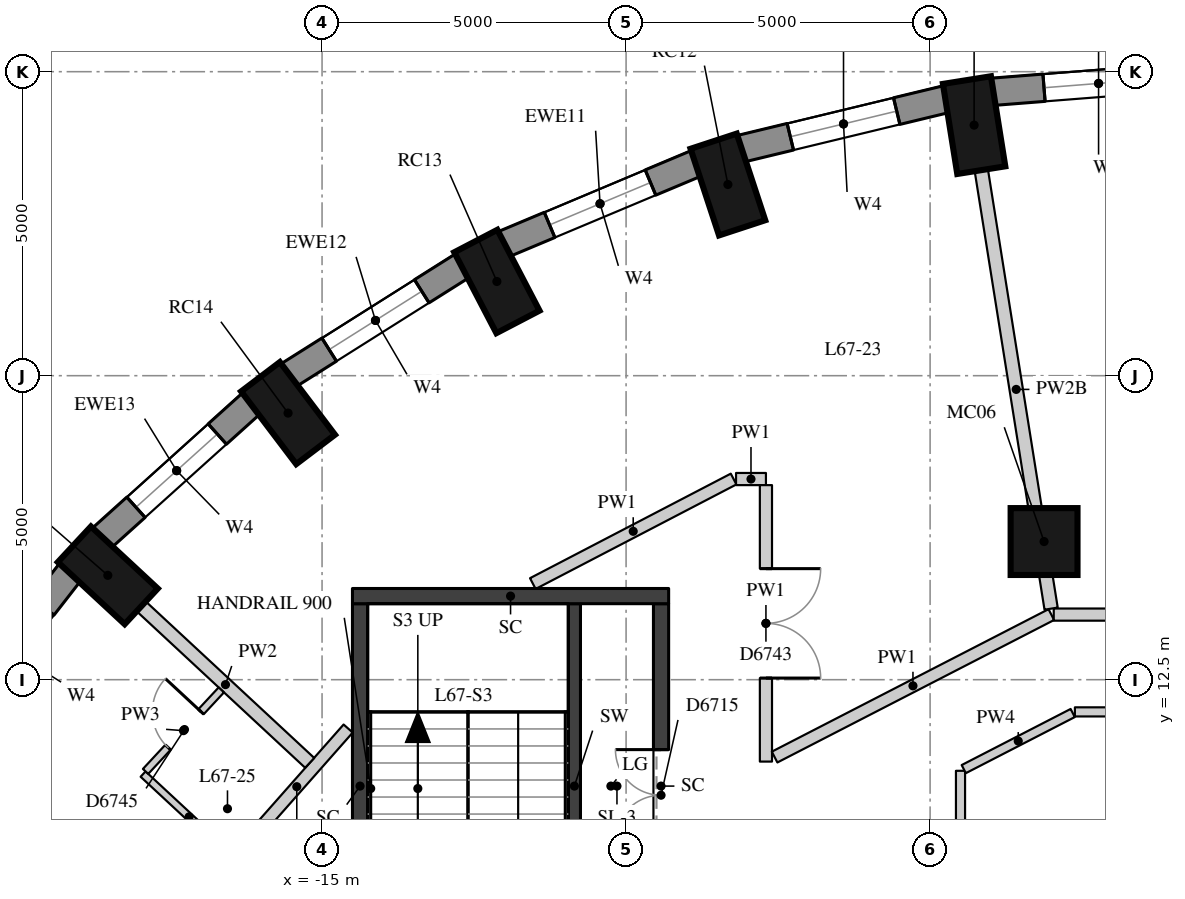
"""IFC4 building model, lengths in metres.
Left out: names, types, materials, properties, quantities, classifications, styles, units other than length and angle.
Written with IfcOpenShell. Run it as: python <this file> out.ifc"""

import sys

from ifc_helpers import new_model, si_unit, direction, frame, frame_2d, origin, origin_2d, place, context, subcontext, project, spatial, rectangle, extrude, element, fill, save


model = new_model("IFC4")
c1 = context("Model", 3, precision=1e-05, world=origin(), true_north=direction((0.0, 1.0)))
c2 = subcontext(c1, "Body", "Model", "MODEL_VIEW")
j1 = project(units=[si_unit("LENGTHUNIT", "METRE"), si_unit("PLANEANGLEUNIT", "RADIAN")], contexts=[c1])
p1 = place(None, origin())
s1 = spatial("IfcSite", under=j1, at=p1, CompositionType="ELEMENT")
p2 = place(p1, origin())
s2 = spatial("IfcBuilding", under=s1, at=p2, CompositionType="ELEMENT")
p3 = place(p2, frame((0.0, 0.0, 236.6)))
s3 = spatial("IfcBuildingStorey", under=s2, at=p3, CompositionType="ELEMENT", Elevation=236.6)
for number, where, z_axis, x_axis in (
    (1, (-4.276, 21.621, 0.0), (0.0, 0.0, 1.0), (-0.157, 0.988, 0.0)),
    (2, (-8.326, 20.644, 0.0), (0.0, 0.0, 1.0), (-0.312, 0.95, 0.0)),
    (3, (-12.125, 19.05, 0.0), (0.0, 0.0, 1.0), (-0.462, 0.887, 0.0)),
    (4, (-15.559, 16.885, 0.0), (0.0, 0.0, 1.0), (-0.604, 0.797, 0.0)),
    (5, (-18.523, 14.216, 0.0), (0.0, 0.0, 1.0), (-0.733, 0.681, 0.0)),
):
    element("IfcColumn", number, at=place(p3, frame(where, z_axis=z_axis, x_axis=x_axis)), inside=s3, PredefinedType="COLUMN", context=c2, shape_type="SweptSolid", body=[
        extrude(rectangle(XDim=1.5, YDim=0.8, at=origin_2d()), origin(), (0.0, 0.0, 1.0), 3.3),
    ])
p4 = place(p3, frame((-3.126, 14.772, 0.0), z_axis=(0.0, 0.0, 1.0), x_axis=(1.0, 0.0, 0.0)))
e6 = element("IfcColumn", 6, at=p4, inside=s3, PredefinedType="COLUMN", context=c2, shape_type="SweptSolid", body=[
    extrude(rectangle(XDim=1.1, YDim=1.1, at=origin_2d()), origin(), (0.0, 0.0, 1.0), 3.3),
])
p5 = place(p3, frame((-0.48, 22.444, 0.0), z_axis=(0.0, 0.0, 1.0), x_axis=(-0.996910775835, -0.078542377245, 0.0)))
e7 = element("IfcWall", 7, at=p5, inside=s3, PredefinedType="SOLIDWALL", context=c2, shape_type="SweptSolid", body=[
    extrude(rectangle(XDim=3.509, YDim=0.45, at=frame_2d((1.755, 0.0))), origin(), (0.0, 0.0, 1.0), 3.02),
])
p6 = place(p5, frame((0.855, 0.0, 0.4)))
e8 = element("IfcOpeningElement", 8, at=p6, cuts=e7, PredefinedType="OPENING", context=c2, shape_type="SweptSolid", body=[
    extrude(rectangle(XDim=1.8, YDim=1.75, at=frame_2d((0.9, 0.875))), frame((0.0, 0.235, 0.0), z_axis=(0.0, -1.0, 0.0), x_axis=(1.0, 0.0, 0.0)), (0.0, 0.0, 1.0), 0.47),
])
p7 = place(p3, frame((-4.729, 22.05, 0.0), z_axis=(0.0, 0.0, 1.0), x_axis=(-0.972099278496, -0.23456980357, 0.0)))
e9 = element("IfcWall", 9, at=p7, inside=s3, PredefinedType="SOLIDWALL", context=c2, shape_type="SweptSolid", body=[
    extrude(rectangle(XDim=3.487, YDim=0.45, at=frame_2d((1.743, 0.0))), origin(), (0.0, 0.0, 1.0), 3.02),
])
p8 = place(p7, frame((0.843, 0.0, 0.4)))
e10 = element("IfcOpeningElement", 10, at=p8, cuts=e9, PredefinedType="OPENING", context=c2, shape_type="SweptSolid", body=[
    extrude(rectangle(XDim=1.8, YDim=1.75, at=frame_2d((0.9, 0.875))), frame((0.0, 0.235, 0.0), z_axis=(0.0, -1.0, 0.0), x_axis=(1.0, 0.0, 0.0)), (0.0, 0.0, 1.0), 0.47),
])
p9 = place(p3, frame((-8.841, 20.995, 0.0), z_axis=(0.0, 0.0, 1.0), x_axis=(-0.922024627475, -0.387131226239, 0.0)))
e11 = element("IfcWall", 11, at=p9, inside=s3, PredefinedType="SOLIDWALL", context=c2, shape_type="SweptSolid", body=[
    extrude(rectangle(XDim=3.443, YDim=0.45, at=frame_2d((1.722, 0.0))), origin(), (0.0, 0.0, 1.0), 3.02),
])
p10 = place(p9, frame((0.822, 0.0, 0.4)))
e12 = element("IfcOpeningElement", 12, at=p10, cuts=e11, PredefinedType="OPENING", context=c2, shape_type="SweptSolid", body=[
    extrude(rectangle(XDim=1.8, YDim=1.75, at=frame_2d((0.9, 0.875))), frame((0.0, 0.235, 0.0), z_axis=(0.0, -1.0, 0.0), x_axis=(1.0, 0.0, 0.0)), (0.0, 0.0, 1.0), 0.47),
])
p11 = place(p3, frame((-12.69, 19.311, 0.0), z_axis=(0.0, 0.0, 1.0), x_axis=(-0.845929139811, -0.53329531258, 0.0)))
e13 = element("IfcWall", 13, at=p11, inside=s3, PredefinedType="SOLIDWALL", context=c2, shape_type="SweptSolid", body=[
    extrude(rectangle(XDim=3.385, YDim=0.45, at=frame_2d((1.692, 0.0))), origin(), (0.0, 0.0, 1.0), 3.02),
])
p12 = place(p11, frame((0.792, 0.0, 0.4)))
e14 = element("IfcOpeningElement", 14, at=p12, cuts=e13, PredefinedType="OPENING", context=c2, shape_type="SweptSolid", body=[
    extrude(rectangle(XDim=1.8, YDim=1.75, at=frame_2d((0.9, 0.875))), frame((0.0, 0.235, 0.0), z_axis=(0.0, -1.0, 0.0), x_axis=(1.0, 0.0, 0.0)), (0.0, 0.0, 1.0), 0.47),
])
p13 = place(p3, frame((-16.159, 17.047, 0.0), z_axis=(0.0, 0.0, 1.0), x_axis=(-0.743166014219, -0.669107073128, 0.0)))
e15 = element("IfcWall", 15, at=p13, inside=s3, PredefinedType="SOLIDWALL", context=c2, shape_type="SweptSolid", body=[
    extrude(rectangle(XDim=3.316, YDim=0.45, at=frame_2d((1.658, 0.0))), origin(), (0.0, 0.0, 1.0), 3.02),
])
p14 = place(p13, frame((0.758, 0.0, 0.4)))
e16 = element("IfcOpeningElement", 16, at=p14, cuts=e15, PredefinedType="OPENING", context=c2, shape_type="SweptSolid", body=[
    extrude(rectangle(XDim=1.8, YDim=1.75, at=frame_2d((0.9, 0.875))), frame((0.0, 0.235, 0.0), z_axis=(0.0, -1.0, 0.0), x_axis=(1.0, 0.0, 0.0)), (0.0, 0.0, 1.0), 0.47),
])
p15 = place(p3, frame((-19.142, 14.272, 0.0), z_axis=(0.0, 0.0, 1.0), x_axis=(-0.613862536705, -0.789412937587, 0.0)))
e17 = element("IfcWall", 17, at=p15, inside=s3, PredefinedType="SOLIDWALL", context=c2, shape_type="SweptSolid", body=[
    extrude(rectangle(XDim=3.247, YDim=0.45, at=frame_2d((1.624, 0.0))), origin(), (0.0, 0.0, 1.0), 3.02),
])
p16 = place(p15, frame((0.724, 0.0, 0.4)))
e18 = element("IfcOpeningElement", 18, at=p16, cuts=e17, PredefinedType="OPENING", context=c2, shape_type="SweptSolid", body=[
    extrude(rectangle(XDim=1.8, YDim=1.75, at=frame_2d((0.9, 0.875))), frame((0.0, 0.235, 0.0), z_axis=(0.0, -1.0, 0.0), x_axis=(1.0, 0.0, 0.0)), (0.0, 0.0, 1.0), 0.47),
])
p17 = place(p3, frame((-10.85, 7.75, 0.0), z_axis=(0.0, 0.0, 1.0), x_axis=(0.0, 1.0, 0.0)))
e19 = element("IfcWall", 19, at=p17, inside=s3, PredefinedType="SHEAR", context=c2, shape_type="SweptSolid", body=[
    extrude(rectangle(XDim=6.0, YDim=0.2, at=frame_2d((3.0, 0.0))), origin(), (0.0, 0.0, 1.0), 3.02),
])
p18 = place(p17, frame((0.1, 0.0, 0.0)))
e20 = element("IfcOpeningElement", 20, at=p18, cuts=e19, PredefinedType="OPENING", context=c2, shape_type="SweptSolid", body=[
    extrude(rectangle(XDim=1.5, YDim=2.1, at=frame_2d((0.75, 1.05))), frame((0.0, 0.11, 0.0), z_axis=(0.0, -1.0, 0.0), x_axis=(1.0, 0.0, 0.0)), (0.0, 0.0, 1.0), 0.22),
])
p19 = place(p3, frame((-14.375, 7.75, -0.28), z_axis=(0.0, 0.0, 1.0), x_axis=(0.0, 1.0, 0.0)))
e21 = element("IfcWall", 21, at=p19, inside=s3, PredefinedType="SHEAR", context=c2, shape_type="SweptSolid", body=[
    extrude(rectangle(XDim=6.0, YDim=0.25, at=frame_2d((3.0, 0.0))), origin(), (0.0, 0.0, 1.0), 3.3),
])
p20 = place(p3, frame((-9.425, 7.75, -0.28), z_axis=(0.0, 0.0, 1.0), x_axis=(0.0, 1.0, 0.0)))
e22 = element("IfcWall", 22, at=p20, inside=s3, PredefinedType="SHEAR", context=c2, shape_type="SweptSolid", body=[
    extrude(rectangle(XDim=6.0, YDim=0.25, at=frame_2d((3.0, 0.0))), origin(), (0.0, 0.0, 1.0), 3.3),
])
p21 = place(p20, frame((2.1, 0.0, 0.28)))
e23 = element("IfcOpeningElement", 23, at=p21, cuts=e22, PredefinedType="OPENING", context=c2, shape_type="SweptSolid", body=[
    extrude(rectangle(XDim=1.5, YDim=2.1, at=frame_2d((0.75, 1.05))), frame((0.0, 0.135, 0.0), z_axis=(0.0, -1.0, 0.0), x_axis=(1.0, 0.0, 0.0)), (0.0, 0.0, 1.0), 0.27),
])
p22 = place(p3, frame((-14.5, 13.875, -0.28), z_axis=(0.0, 0.0, 1.0), x_axis=(1.0, 0.0, 0.0)))
e24 = element("IfcWall", 24, at=p22, inside=s3, PredefinedType="SHEAR", context=c2, shape_type="SweptSolid", body=[
    extrude(rectangle(XDim=5.2, YDim=0.25, at=frame_2d((2.6, 0.0))), origin(), (0.0, 0.0, 1.0), 3.3),
])
p23 = place(p3, frame((-11.534, 14.081, 0.0), z_axis=(0.0, 0.0, 1.0), x_axis=(0.886975089277, 0.461817270143, 0.0)))
e25 = element("IfcWall", 25, at=p23, inside=s3, PredefinedType="PARTITIONING", context=c2, shape_type="SweptSolid", body=[
    extrude(rectangle(XDim=3.723, YDim=0.2, at=frame_2d((1.861, 0.0))), origin(), (0.0, 0.0, 1.0), 3.02),
])
p24 = place(p3, frame((-8.192, 15.8, 0.0), z_axis=(0.0, 0.0, 1.0), x_axis=(1.0, 0.0, 0.0)))
e26 = element("IfcWall", 26, at=p24, inside=s3, PredefinedType="PARTITIONING", context=c2, shape_type="SweptSolid", body=[
    extrude(rectangle(XDim=0.492, YDim=0.2, at=frame_2d((0.246, 0.0))), origin(), (0.0, 0.0, 1.0), 3.02),
])
p25 = place(p3, frame((-7.7, 15.7, 0.0), z_axis=(0.0, 0.0, 1.0), x_axis=(0.0, -1.0, 0.0)))
e27 = element("IfcWall", 27, at=p25, inside=s3, PredefinedType="PARTITIONING", context=c2, shape_type="SweptSolid", body=[
    extrude(rectangle(XDim=4.547, YDim=0.2, at=frame_2d((2.273, 0.0))), origin(), (0.0, 0.0, 1.0), 3.02),
])
p26 = place(p25, frame((1.374, 0.0, 0.0)))
e28 = element("IfcOpeningElement", 28, at=p26, cuts=e27, PredefinedType="OPENING", context=c2, shape_type="SweptSolid", body=[
    extrude(rectangle(XDim=1.8, YDim=2.1, at=frame_2d((0.9, 1.05))), frame((0.0, 0.11, 0.0), z_axis=(0.0, -1.0, 0.0), x_axis=(1.0, 0.0, 0.0)), (0.0, 0.0, 1.0), 0.22),
])
p27 = place(p3, frame((-7.557, 11.227, 0.0), z_axis=(0.0, 0.0, 1.0), x_axis=(0.889060449642, 0.457789817364, 0.0)))
e29 = element("IfcWall", 29, at=p27, inside=s3, PredefinedType="PARTITIONING", context=c2, shape_type="SweptSolid", body=[
    extrude(rectangle(XDim=5.119, YDim=0.2, at=frame_2d((2.559, 0.0))), origin(), (0.0, 0.0, 1.0), 3.02),
])
p28 = place(p3, frame((-2.967, 13.571, 0.0), z_axis=(0.0, 0.0, 1.0), x_axis=(1.0, 0.0, 0.0)))
e30 = element("IfcWall", 30, at=p28, inside=s3, PredefinedType="PARTITIONING", context=c2, shape_type="SweptSolid", body=[
    extrude(rectangle(XDim=5.773, YDim=0.2, at=frame_2d((2.887, 0.0))), origin(), (0.0, 0.0, 1.0), 3.02),
])
p29 = place(p28, frame((2.441, 0.0, 0.0)))
e31 = element("IfcOpeningElement", 31, at=p29, cuts=e30, PredefinedType="OPENING", context=c2, shape_type="SweptSolid", body=[
    extrude(rectangle(XDim=1.1, YDim=2.1, at=frame_2d((0.55, 1.05))), frame((0.0, 0.11, 0.0), z_axis=(0.0, -1.0, 0.0), x_axis=(1.0, 0.0, 0.0)), (0.0, 0.0, 1.0), 0.22),
])
p30 = place(p3, frame((-16.26, 9.783, 0.0), z_axis=(0.0, 0.0, 1.0), x_axis=(0.66199168739, 0.74951117792, 0.0)))
e32 = element("IfcWall", 32, at=p30, inside=s3, PredefinedType="PARTITIONING", context=c2, shape_type="SweptSolid", body=[
    extrude(rectangle(XDim=2.552, YDim=0.2, at=frame_2d((1.276, 0.0))), origin(), (0.0, 0.0, 1.0), 3.02),
])
p31 = place(p3, frame((-2.619, 11.97, 0.0), z_axis=(0.0, 0.0, 1.0), x_axis=(1.0, 0.0, 0.0)))
e33 = element("IfcWall", 33, at=p31, inside=s3, PredefinedType="PARTITIONING", context=c2, shape_type="SweptSolid", body=[
    extrude(rectangle(XDim=4.019, YDim=0.15, at=frame_2d((2.009, 0.0))), origin(), (0.0, 0.0, 1.0), 3.02),
])
p32 = place(p31, frame((1.559, 0.0, 0.0)))
e34 = element("IfcOpeningElement", 34, at=p32, cuts=e33, PredefinedType="OPENING", context=c2, shape_type="SweptSolid", body=[
    extrude(rectangle(XDim=0.9, YDim=2.1, at=frame_2d((0.45, 1.05))), frame((0.0, 0.085, 0.0), z_axis=(0.0, -1.0, 0.0), x_axis=(1.0, 0.0, 0.0)), (0.0, 0.0, 1.0), 0.17),
])
p33 = place(p3, frame((-4.5, 8.356, 0.0), z_axis=(0.0, 0.0, 1.0), x_axis=(0.0, 1.0, 0.0)))
e35 = element("IfcWall", 35, at=p33, inside=s3, PredefinedType="PARTITIONING", context=c2, shape_type="SweptSolid", body=[
    extrude(rectangle(XDim=2.645, YDim=0.15, at=frame_2d((1.323, 0.0))), origin(), (0.0, 0.0, 1.0), 3.02),
])
p34 = place(p3, frame((-4.447, 11.029, 0.0), z_axis=(0.0, 0.0, 1.0), x_axis=(0.88908361723, 0.457744821459, 0.0)))
e36 = element("IfcWall", 36, at=p34, inside=s3, PredefinedType="PARTITIONING", context=c2, shape_type="SweptSolid", body=[
    extrude(rectangle(XDim=2.016, YDim=0.15, at=frame_2d((1.008, 0.0))), origin(), (0.0, 0.0, 1.0), 3.02),
])
p35 = place(p3, frame((-4.158, 20.88, 0.0), z_axis=(0.0, 0.0, 1.0), x_axis=(0.157260291638, -0.987557188559, 0.0)))
e37 = element("IfcWall", 37, at=p35, inside=s3, PredefinedType="PARTITIONING", context=c2, shape_type="SweptSolid", body=[
    extrude(rectangle(XDim=7.303, YDim=0.22, at=frame_2d((3.651, 0.0))), origin(), (0.0, 0.0, 1.0), 2.57),
])
p36 = place(p3, frame((-17.974, 13.706, 0.0), z_axis=(0.0, 0.0, 1.0), x_axis=(0.732644022802, -0.680612030346, 0.0)))
e38 = element("IfcWall", 38, at=p36, inside=s3, PredefinedType="PARTITIONING", context=c2, shape_type="SweptSolid", body=[
    extrude(rectangle(XDim=3.782, YDim=0.22, at=frame_2d((1.891, 0.0))), origin(), (0.0, 0.0, 1.0), 3.02),
])
p37 = place(p3, frame((-16.429, 9.541, 0.0), z_axis=(0.0, 0.0, 1.0), x_axis=(-0.732625124054, 0.680632373315, 0.0)))
e39 = element("IfcWall", 39, at=p37, inside=s3, PredefinedType="PARTITIONING", context=c2, shape_type="SweptSolid", body=[
    extrude(rectangle(XDim=2.066, YDim=0.12, at=frame_2d((1.033, 0.0))), origin(), (0.0, 0.0, 1.0), 3.02),
])
p38 = place(p3, frame((-17.902, 10.991, 0.0), z_axis=(0.0, 0.0, 1.0), x_axis=(0.680681343043, 0.732579626548, 0.0)))
e40 = element("IfcWall", 40, at=p38, inside=s3, PredefinedType="PARTITIONING", context=c2, shape_type="SweptSolid", body=[
    extrude(rectangle(XDim=1.83, YDim=0.12, at=frame_2d((0.915, 0.0))), origin(), (0.0, 0.0, 1.0), 3.02),
])
p39 = place(p38, frame((0.54, 0.0, 0.0)))
e41 = element("IfcOpeningElement", 41, at=p39, cuts=e40, PredefinedType="OPENING", context=c2, shape_type="SweptSolid", body=[
    extrude(rectangle(XDim=0.8, YDim=2.1, at=frame_2d((0.4, 1.05))), frame((0.0, 0.07, 0.0), z_axis=(0.0, -1.0, 0.0), x_axis=(1.0, 0.0, 0.0)), (0.0, 0.0, 1.0), 0.14),
])
p40 = place(p6, origin())
e42 = element("IfcWindow", 42, at=p40, inside=s3, PartitioningType="SINGLE_PANEL", PredefinedType="WINDOW", context=c2, shape_type="SweptSolid", body=[
    extrude(rectangle(XDim=1.8, YDim=1.75, at=frame_2d((0.9, 0.875))), frame((0.0, 0.035, 0.0), z_axis=(0.0, -1.0, 0.0), x_axis=(1.0, 0.0, 0.0)), (0.0, 0.0, 1.0), 0.06),
])
fill(e8, e42)
p41 = place(p8, origin())
e43 = element("IfcWindow", 43, at=p41, inside=s3, PartitioningType="SINGLE_PANEL", PredefinedType="WINDOW", context=c2, shape_type="SweptSolid", body=[
    extrude(rectangle(XDim=1.8, YDim=1.75, at=frame_2d((0.9, 0.875))), frame((0.0, 0.035, 0.0), z_axis=(0.0, -1.0, 0.0), x_axis=(1.0, 0.0, 0.0)), (0.0, 0.0, 1.0), 0.06),
])
fill(e10, e43)
p42 = place(p10, origin())
e44 = element("IfcWindow", 44, at=p42, inside=s3, PartitioningType="SINGLE_PANEL", PredefinedType="WINDOW", context=c2, shape_type="SweptSolid", body=[
    extrude(rectangle(XDim=1.8, YDim=1.75, at=frame_2d((0.9, 0.875))), frame((0.0, 0.035, 0.0), z_axis=(0.0, -1.0, 0.0), x_axis=(1.0, 0.0, 0.0)), (0.0, 0.0, 1.0), 0.06),
])
fill(e12, e44)
p43 = place(p12, origin())
e45 = element("IfcWindow", 45, at=p43, inside=s3, PartitioningType="SINGLE_PANEL", PredefinedType="WINDOW", context=c2, shape_type="SweptSolid", body=[
    extrude(rectangle(XDim=1.8, YDim=1.75, at=frame_2d((0.9, 0.875))), frame((0.0, 0.035, 0.0), z_axis=(0.0, -1.0, 0.0), x_axis=(1.0, 0.0, 0.0)), (0.0, 0.0, 1.0), 0.06),
])
fill(e14, e45)
p44 = place(p14, origin())
e46 = element("IfcWindow", 46, at=p44, inside=s3, PartitioningType="SINGLE_PANEL", PredefinedType="WINDOW", context=c2, shape_type="SweptSolid", body=[
    extrude(rectangle(XDim=1.8, YDim=1.75, at=frame_2d((0.9, 0.875))), frame((0.0, 0.035, 0.0), z_axis=(0.0, -1.0, 0.0), x_axis=(1.0, 0.0, 0.0)), (0.0, 0.0, 1.0), 0.06),
])
fill(e16, e46)
p45 = place(p21, origin())
e47 = element("IfcDoor", 47, at=p45, inside=s3, OperationType="DOUBLE_DOOR_SINGLE_SWING", PredefinedType="DOOR", context=c2, shape_type="SweptSolid", body=[
    extrude(rectangle(XDim=1.5, YDim=2.1, at=frame_2d((0.75, 1.05))), frame((0.0, 0.025, 0.0), z_axis=(0.0, -1.0, 0.0), x_axis=(1.0, 0.0, 0.0)), (0.0, 0.0, 1.0), 0.05),
])
fill(e23, e47)
p46 = place(p26, origin())
e48 = element("IfcDoor", 48, at=p46, inside=s3, OperationType="DOUBLE_DOOR_SINGLE_SWING", PredefinedType="DOOR", context=c2, shape_type="SweptSolid", body=[
    extrude(rectangle(XDim=1.8, YDim=2.1, at=frame_2d((0.9, 1.05))), frame((0.0, 0.025, 0.0), z_axis=(0.0, -1.0, 0.0), x_axis=(1.0, 0.0, 0.0)), (0.0, 0.0, 1.0), 0.05),
])
fill(e28, e48)
p47 = place(p39, origin())
e49 = element("IfcDoor", 49, at=p47, inside=s3, OperationType="SINGLE_SWING_RIGHT", PredefinedType="DOOR", context=c2, shape_type="SweptSolid", body=[
    extrude(rectangle(XDim=0.8, YDim=2.1, at=frame_2d((0.4, 1.05))), frame((0.0, 0.025, 0.0), z_axis=(0.0, -1.0, 0.0), x_axis=(1.0, 0.0, 0.0)), (0.0, 0.0, 1.0), 0.05),
])
fill(e41, e49)
save(model, sys.argv[1])
